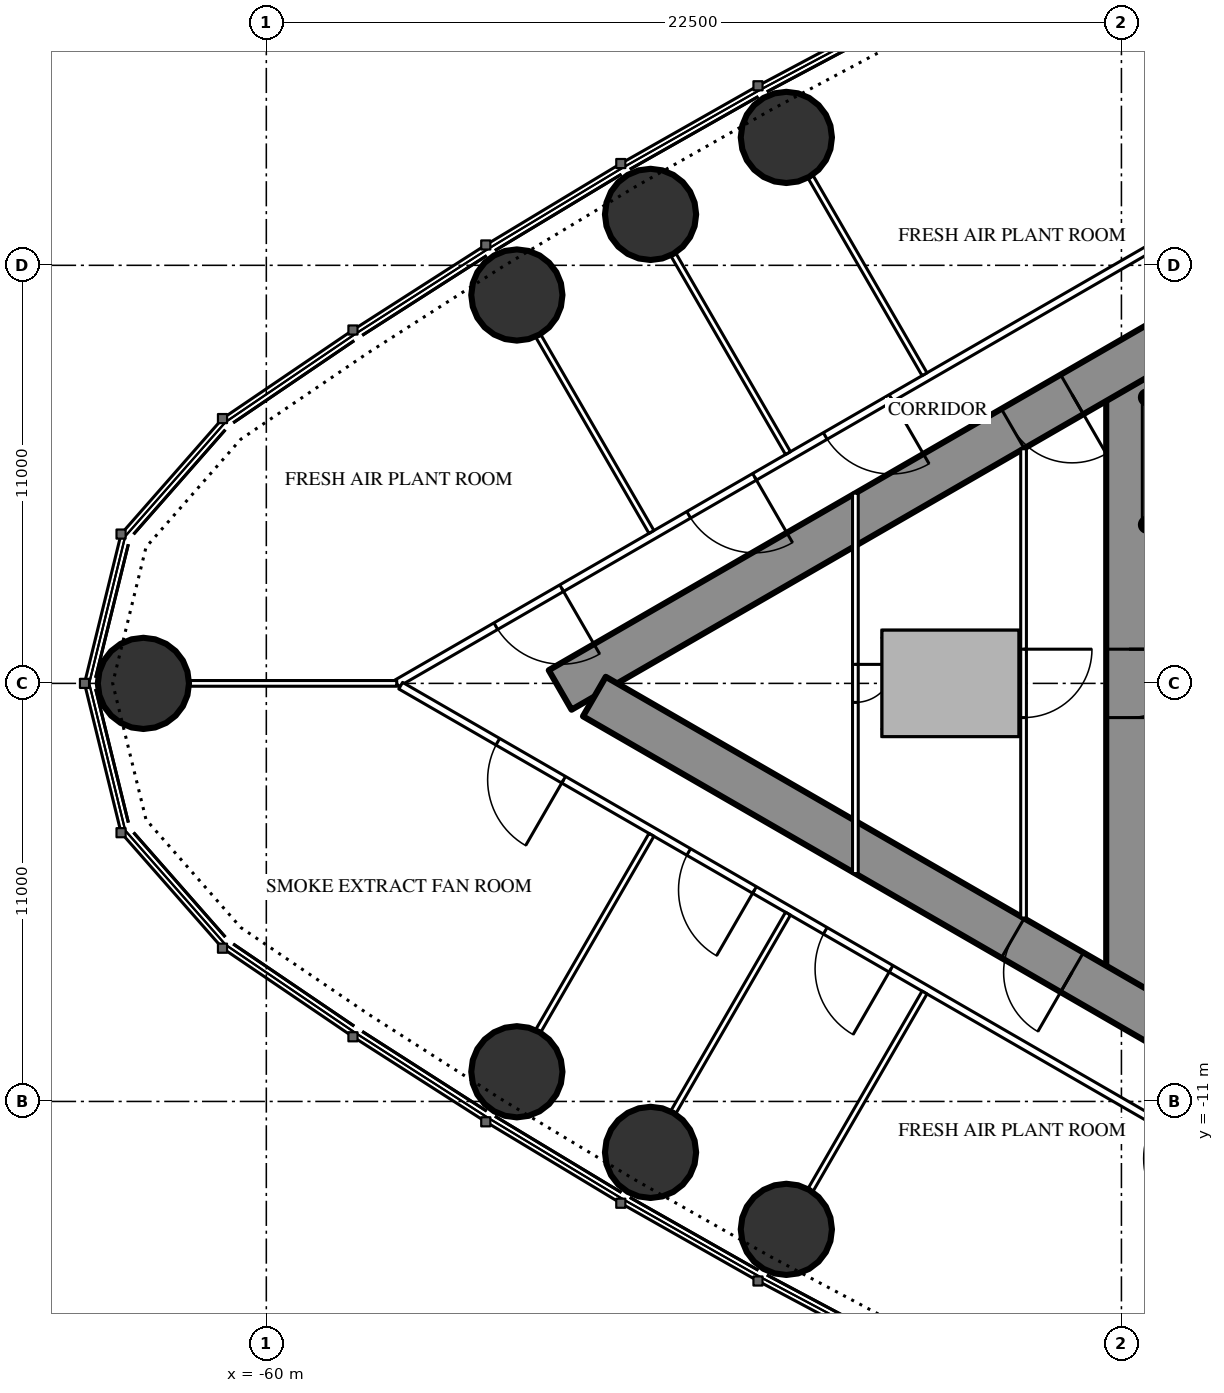
"""IFC4 building model, lengths in metres.
Left out: names, types, materials, properties, quantities, classifications, styles, units other than length and angle.
Written with IfcOpenShell. Run it as: python <this file> out.ifc"""

import sys

from ifc_helpers import new_model, si_unit, direction, frame, frame_2d, origin, origin_2d, place, context, subcontext, project, spatial, rectangle, circle, hollow_circle, extrude, element, fill, save


model = new_model("IFC4")
c1 = context("Model", 3, precision=1e-05, world=origin(), true_north=direction((0.0, 1.0)))
c2 = subcontext(c1, "Body", "Model", "MODEL_VIEW")
j1 = project(units=[si_unit("LENGTHUNIT", "METRE"), si_unit("PLANEANGLEUNIT", "RADIAN")], contexts=[c1])
p1 = place(None, origin())
s1 = spatial("IfcSite", under=j1, at=p1, CompositionType="ELEMENT")
p2 = place(p1, origin())
s2 = spatial("IfcBuilding", under=s1, at=p2, CompositionType="ELEMENT")
p3 = place(p2, frame((0.0, 0.0, 268.3)))
s3 = spatial("IfcBuildingStorey", under=s2, at=p3, CompositionType="ELEMENT", Elevation=268.3)
for number, where, z_axis, x_axis in (
    (1, (-63.234, 0.0, 0.0), (0.0, 0.0, 1.0), (1.0, 0.0, 0.0)),
    (2, (-53.408, -10.219, 0.0), (0.0, 0.0, 1.0), (1.0, 0.0, 0.0)),
    (3, (-49.89, -12.34, 0.0), (0.0, 0.0, 1.0), (1.0, 0.0, 0.0)),
    (4, (-46.317, -14.365, 0.0), (0.0, 0.0, 1.0), (1.0, 0.0, 0.0)),
    (5, (-46.317, 14.365, 0.0), (0.0, 0.0, 1.0), (1.0, 0.0, 0.0)),
    (6, (-49.89, 12.34, 0.0), (0.0, 0.0, 1.0), (1.0, 0.0, 0.0)),
    (7, (-53.408, 10.219, 0.0), (0.0, 0.0, 1.0), (1.0, 0.0, 0.0)),
):
    element("IfcColumn", number, at=place(p3, frame(where, z_axis=z_axis, x_axis=x_axis)), inside=s3, PredefinedType="COLUMN", context=c2, shape_type="SweptSolid", body=[
        extrude(circle(Radius=1.2, at=origin_2d()), origin(), (0.0, 0.0, 1.0), 5.0),
    ])
p4 = place(p3, frame((-37.3, 8.6, 0.0), z_axis=(0.0, 0.0, 1.0), x_axis=(0.0, -1.0, 0.0)))
e8 = element("IfcWall", 8, at=p4, inside=s3, PredefinedType="SHEAR", context=c2, shape_type="SweptSolid", body=[
    extrude(rectangle(XDim=17.2, YDim=1.2, at=frame_2d((8.6, 0.0))), origin(), (0.0, 0.0, 1.0), 5.0),
])
p5 = place(p4, frame((7.7, 0.0, 0.0)))
e9 = element("IfcOpeningElement", 9, at=p5, cuts=e8, PredefinedType="OPENING", context=c2, shape_type="SweptSolid", body=[
    extrude(rectangle(XDim=1.8, YDim=2.2, at=frame_2d((0.9, 1.1))), frame((0.0, 0.61, 0.0), z_axis=(0.0, -1.0, 0.0), x_axis=(1.0, 0.0, 0.0)), (0.0, 0.0, 1.0), 1.22),
])
p6 = place(p3, frame((-27.2, 14.3, 0.0), z_axis=(0.0, 0.0, 1.0), x_axis=(-0.866026593062, -0.499997940104, 0.0)))
e10 = element("IfcWall", 10, at=p6, inside=s3, PredefinedType="SHEAR", context=c2, shape_type="SweptSolid", body=[
    extrude(rectangle(XDim=28.946, YDim=1.2, at=frame_2d((14.473, 0.0))), origin(), (0.0, 0.0, 1.0), 5.0),
])
p7 = place(p6, frame((4.6, 0.0, 0.0)))
e11 = element("IfcOpeningElement", 11, at=p7, cuts=e10, PredefinedType="OPENING", context=c2, shape_type="SweptSolid", body=[
    extrude(rectangle(XDim=1.0, YDim=2.2, at=frame_2d((0.5, 1.1))), frame((0.0, 0.61, 0.0), z_axis=(0.0, -1.0, 0.0), x_axis=(1.0, 0.0, 0.0)), (0.0, 0.0, 1.0), 1.22),
])
p8 = place(p6, frame((13.395, 0.0, 0.0)))
e12 = element("IfcOpeningElement", 12, at=p8, cuts=e10, PredefinedType="OPENING", context=c2, shape_type="SweptSolid", body=[
    extrude(rectangle(XDim=1.8, YDim=2.2, at=frame_2d((0.9, 1.1))), frame((0.0, 0.61, 0.0), z_axis=(0.0, -1.0, 0.0), x_axis=(1.0, 0.0, 0.0)), (0.0, 0.0, 1.0), 1.22),
])
p9 = place(p3, frame((-27.2, -14.3, 0.0), z_axis=(0.0, 0.0, 1.0), x_axis=(-0.866024021859, 0.500002393557, 0.0)))
e13 = element("IfcWall", 13, at=p9, inside=s3, PredefinedType="SHEAR", context=c2, shape_type="SweptSolid", body=[
    extrude(rectangle(XDim=27.907, YDim=1.2, at=frame_2d((13.954, 0.0))), origin(), (0.0, 0.0, 1.0), 5.0),
])
p10 = place(p9, frame((4.6, 0.0, 0.0)))
e14 = element("IfcOpeningElement", 14, at=p10, cuts=e13, PredefinedType="OPENING", context=c2, shape_type="SweptSolid", body=[
    extrude(rectangle(XDim=1.0, YDim=2.2, at=frame_2d((0.5, 1.1))), frame((0.0, 0.61, 0.0), z_axis=(0.0, -1.0, 0.0), x_axis=(1.0, 0.0, 0.0)), (0.0, 0.0, 1.0), 1.22),
])
p11 = place(p9, frame((13.395, 0.0, 0.0)))
e15 = element("IfcOpeningElement", 15, at=p11, cuts=e13, PredefinedType="OPENING", context=c2, shape_type="SweptSolid", body=[
    extrude(rectangle(XDim=1.8, YDim=2.2, at=frame_2d((0.9, 1.1))), frame((0.0, 0.61, 0.0), z_axis=(0.0, -1.0, 0.0), x_axis=(1.0, 0.0, 0.0)), (0.0, 0.0, 1.0), 1.22),
])
for number, where, z_axis, x_axis in (
    (16, (-36.825, 7.525, 5.0), (0.0, 0.0, 1.0), (1.0, 0.0, 0.0)),
    (17, (-36.825, 4.175, 5.0), (0.0, 0.0, 1.0), (1.0, 0.0, 0.0)),
):
    element("IfcColumn", number, at=place(p3, frame(where, z_axis=z_axis, x_axis=x_axis)), inside=s3, PredefinedType="COLUMN", context=c2, shape_type="SweptSolid", body=[
        extrude(hollow_circle(Radius=0.162, WallThickness=0.012, at=origin_2d()), origin(), (0.0, 0.0, 1.0), 3.0),
    ])
p12 = place(p3, frame((-36.825, 7.422, 5.0), z_axis=(0.0, 0.0, 1.0), x_axis=(0.0, -1.0, 0.0)))
e18 = element("IfcWall", 18, at=p12, inside=s3, PredefinedType="SOLIDWALL", context=c2, shape_type="SweptSolid", body=[
    extrude(rectangle(XDim=3.144, YDim=0.25, at=frame_2d((1.572, 0.0))), origin(), (0.0, 0.0, 1.0), 2.54),
])
for number, where, z_axis, x_axis in (
    (19, (-43.8, -1.3, 5.0), (0.0, 0.0, 1.0), (1.0, 0.0, 0.0)),
    (20, (-40.2, 1.3, 5.0), (0.0, 0.0, 1.0), (-1.0, 0.0, 0.0)),
):
    element("IfcWall", number, at=place(p3, frame(where, z_axis=z_axis, x_axis=x_axis)), inside=s3, PredefinedType="SOLIDWALL", context=c2, shape_type="SweptSolid", body=[
        extrude(rectangle(XDim=3.6, YDim=0.2, at=frame_2d((1.8, 0.0))), origin(), (0.0, 0.0, 1.0), 2.6),
    ])
p13 = place(p3, frame((-43.7, 1.2, 5.0), z_axis=(0.0, 0.0, 1.0), x_axis=(0.0, -1.0, 0.0)))
e21 = element("IfcWall", 21, at=p13, inside=s3, PredefinedType="SOLIDWALL", context=c2, shape_type="SweptSolid", body=[
    extrude(rectangle(XDim=2.4, YDim=0.2, at=frame_2d((1.2, 0.0))), origin(), (0.0, 0.0, 1.0), 2.6),
])
p14 = place(p3, frame((-40.3, -1.2, 5.0), z_axis=(0.0, 0.0, 1.0), x_axis=(0.0, 1.0, 0.0)))
e22 = element("IfcWall", 22, at=p14, inside=s3, PredefinedType="SOLIDWALL", context=c2, shape_type="SweptSolid", body=[
    extrude(rectangle(XDim=2.4, YDim=0.2, at=frame_2d((1.2, 0.0))), origin(), (0.0, 0.0, 1.0), 2.6),
])
p15 = place(p14, frame((0.7, 0.0, 0.0)))
e23 = element("IfcOpeningElement", 23, at=p15, cuts=e22, PredefinedType="OPENING", context=c2, shape_type="SweptSolid", body=[
    extrude(rectangle(XDim=1.0, YDim=2.2, at=frame_2d((0.5, 1.1))), frame((0.0, 0.11, 0.0), z_axis=(0.0, -1.0, 0.0), x_axis=(1.0, 0.0, 0.0)), (0.0, 0.0, 1.0), 0.22),
])
p16 = place(p3, frame((-28.737, 16.068, 0.0), z_axis=(0.0, 0.0, 1.0), x_axis=(-0.866026057212, -0.499998868229, 0.0)))
e24 = element("IfcWall", 24, at=p16, inside=s3, PredefinedType="PARTITIONING", context=c2, shape_type="SweptSolid", body=[
    extrude(rectangle(XDim=32.137, YDim=0.2, at=frame_2d((16.068, 0.0))), origin(), (0.0, 0.0, 1.0), 4.7),
])
p17 = place(p16, frame((7.134, 0.0, 0.0)))
e25 = element("IfcOpeningElement", 25, at=p17, cuts=e24, PredefinedType="OPENING", context=c2, shape_type="SweptSolid", body=[
    extrude(rectangle(XDim=2.0, YDim=2.4, at=frame_2d((1.0, 1.2))), frame((0.0, 0.11, 0.0), z_axis=(0.0, -1.0, 0.0), x_axis=(1.0, 0.0, 0.0)), (0.0, 0.0, 1.0), 0.22),
])
p18 = place(p16, frame((17.117, 0.0, 0.0)))
e26 = element("IfcOpeningElement", 26, at=p18, cuts=e24, PredefinedType="OPENING", context=c2, shape_type="SweptSolid", body=[
    extrude(rectangle(XDim=2.0, YDim=2.4, at=frame_2d((1.0, 1.2))), frame((0.0, 0.11, 0.0), z_axis=(0.0, -1.0, 0.0), x_axis=(1.0, 0.0, 0.0)), (0.0, 0.0, 1.0), 0.22),
])
p19 = place(p16, frame((21.266, 0.0, 0.0)))
e27 = element("IfcOpeningElement", 27, at=p19, cuts=e24, PredefinedType="OPENING", context=c2, shape_type="SweptSolid", body=[
    extrude(rectangle(XDim=2.0, YDim=2.4, at=frame_2d((1.0, 1.2))), frame((0.0, 0.11, 0.0), z_axis=(0.0, -1.0, 0.0), x_axis=(1.0, 0.0, 0.0)), (0.0, 0.0, 1.0), 0.22),
])
p20 = place(p16, frame((27.126, 0.0, 0.0)))
e28 = element("IfcOpeningElement", 28, at=p20, cuts=e24, PredefinedType="OPENING", context=c2, shape_type="SweptSolid", body=[
    extrude(rectangle(XDim=2.0, YDim=2.4, at=frame_2d((1.0, 1.2))), frame((0.0, 0.11, 0.0), z_axis=(0.0, -1.0, 0.0), x_axis=(1.0, 0.0, 0.0)), (0.0, 0.0, 1.0), 0.22),
])
p21 = place(p3, frame((-28.737, -16.068, 0.0), z_axis=(0.0, 0.0, 1.0), x_axis=(-0.866026220747, 0.499998584977, 0.0)))
e29 = element("IfcWall", 29, at=p21, inside=s3, PredefinedType="PARTITIONING", context=c2, shape_type="SweptSolid", body=[
    extrude(rectangle(XDim=32.017, YDim=0.2, at=frame_2d((16.008, 0.0))), origin(), (0.0, 0.0, 1.0), 4.7),
])
p22 = place(p21, frame((27.066, 0.0, 0.0)))
e30 = element("IfcOpeningElement", 30, at=p22, cuts=e29, PredefinedType="OPENING", context=c2, shape_type="SweptSolid", body=[
    extrude(rectangle(XDim=2.0, YDim=2.4, at=frame_2d((1.0, 1.2))), frame((0.0, 0.11, 0.0), z_axis=(0.0, -1.0, 0.0), x_axis=(1.0, 0.0, 0.0)), (0.0, 0.0, 1.0), 0.22),
])
p23 = place(p21, frame((21.266, 0.0, 0.0)))
e31 = element("IfcOpeningElement", 31, at=p23, cuts=e29, PredefinedType="OPENING", context=c2, shape_type="SweptSolid", body=[
    extrude(rectangle(XDim=2.0, YDim=2.4, at=frame_2d((1.0, 1.2))), frame((0.0, 0.11, 0.0), z_axis=(0.0, -1.0, 0.0), x_axis=(1.0, 0.0, 0.0)), (0.0, 0.0, 1.0), 0.22),
])
p24 = place(p21, frame((17.117, 0.0, 0.0)))
e32 = element("IfcOpeningElement", 32, at=p24, cuts=e29, PredefinedType="OPENING", context=c2, shape_type="SweptSolid", body=[
    extrude(rectangle(XDim=2.0, YDim=2.4, at=frame_2d((1.0, 1.2))), frame((0.0, 0.11, 0.0), z_axis=(0.0, -1.0, 0.0), x_axis=(1.0, 0.0, 0.0)), (0.0, 0.0, 1.0), 0.22),
])
p25 = place(p21, frame((7.134, 0.0, 0.0)))
e33 = element("IfcOpeningElement", 33, at=p25, cuts=e29, PredefinedType="OPENING", context=c2, shape_type="SweptSolid", body=[
    extrude(rectangle(XDim=2.0, YDim=2.4, at=frame_2d((1.0, 1.2))), frame((0.0, 0.11, 0.0), z_axis=(0.0, -1.0, 0.0), x_axis=(1.0, 0.0, 0.0)), (0.0, 0.0, 1.0), 0.22),
])
p26 = place(p3, frame((-42.68, 8.134, 0.0), z_axis=(0.0, 0.0, 1.0), x_axis=(-0.499984479505, 0.866034364361, 0.0)))
e34 = element("IfcWall", 34, at=p26, inside=s3, PredefinedType="PARTITIONING", context=c2, shape_type="SweptSolid", body=[
    extrude(rectangle(XDim=5.995, YDim=0.15, at=frame_2d((2.998, 0.0))), origin(), (0.0, 0.0, 1.0), 3.8),
])
p27 = place(p3, frame((-46.274, 6.059, 0.0), z_axis=(0.0, 0.0, 1.0), x_axis=(-0.500020471368, 0.866013584312, 0.0)))
e35 = element("IfcWall", 35, at=p27, inside=s3, PredefinedType="PARTITIONING", context=c2, shape_type="SweptSolid", body=[
    extrude(rectangle(XDim=6.028, YDim=0.15, at=frame_2d((3.014, 0.0))), origin(), (0.0, 0.0, 1.0), 3.8),
])
p28 = place(p3, frame((-49.866, 3.985, 0.0), z_axis=(0.0, 0.0, 1.0), x_axis=(-0.500000694566, 0.866025002776, 0.0)))
e36 = element("IfcWall", 36, at=p28, inside=s3, PredefinedType="PARTITIONING", context=c2, shape_type="SweptSolid", body=[
    extrude(rectangle(XDim=5.95, YDim=0.15, at=frame_2d((2.975, 0.0))), origin(), (0.0, 0.0, 1.0), 3.8),
])
p29 = place(p3, frame((-42.68, -8.134, 0.0), z_axis=(0.0, 0.0, 1.0), x_axis=(-0.499984479505, -0.866034364361, 0.0)))
e37 = element("IfcWall", 37, at=p29, inside=s3, PredefinedType="PARTITIONING", context=c2, shape_type="SweptSolid", body=[
    extrude(rectangle(XDim=5.995, YDim=0.15, at=frame_2d((2.998, 0.0))), origin(), (0.0, 0.0, 1.0), 3.8),
])
p30 = place(p3, frame((-46.274, -6.059, 0.0), z_axis=(0.0, 0.0, 1.0), x_axis=(-0.500020471368, -0.866013584312, 0.0)))
e38 = element("IfcWall", 38, at=p30, inside=s3, PredefinedType="PARTITIONING", context=c2, shape_type="SweptSolid", body=[
    extrude(rectangle(XDim=6.028, YDim=0.15, at=frame_2d((3.014, 0.0))), origin(), (0.0, 0.0, 1.0), 3.8),
])
p31 = place(p3, frame((-49.866, -3.985, 0.0), z_axis=(0.0, 0.0, 1.0), x_axis=(-0.500000694566, -0.866025002776, 0.0)))
e39 = element("IfcWall", 39, at=p31, inside=s3, PredefinedType="PARTITIONING", context=c2, shape_type="SweptSolid", body=[
    extrude(rectangle(XDim=5.95, YDim=0.15, at=frame_2d((2.975, 0.0))), origin(), (0.0, 0.0, 1.0), 3.8),
])
p32 = place(p3, frame((-56.568, 0.0, 0.0), z_axis=(0.0, 0.0, 1.0), x_axis=(-1.0, 0.0, 0.0)))
e40 = element("IfcWall", 40, at=p32, inside=s3, PredefinedType="PARTITIONING", context=c2, shape_type="SweptSolid", body=[
    extrude(rectangle(XDim=5.446, YDim=0.15, at=frame_2d((2.723, 0.0))), origin(), (0.0, 0.0, 1.0), 3.8),
])
p33 = place(p3, frame((-40.075, 6.174, 0.0), z_axis=(0.0, 0.0, 1.0), x_axis=(0.0, -1.0, 0.0)))
e41 = element("IfcWall", 41, at=p33, inside=s3, PredefinedType="PARTITIONING", context=c2, shape_type="SweptSolid", body=[
    extrude(rectangle(XDim=12.348, YDim=0.15, at=frame_2d((6.174, 0.0))), origin(), (0.0, 0.0, 1.0), 4.7),
])
p34 = place(p33, frame((5.274, 0.0, 0.0)))
e42 = element("IfcOpeningElement", 42, at=p34, cuts=e41, PredefinedType="OPENING", context=c2, shape_type="SweptSolid", body=[
    extrude(rectangle(XDim=1.8, YDim=2.2, at=frame_2d((0.9, 1.1))), frame((0.0, 0.085, 0.0), z_axis=(0.0, -1.0, 0.0), x_axis=(1.0, 0.0, 0.0)), (0.0, 0.0, 1.0), 0.17),
])
p35 = place(p3, frame((-44.5, 5.005, 0.0), z_axis=(0.0, 0.0, 1.0), x_axis=(0.0, -1.0, 0.0)))
e43 = element("IfcWall", 43, at=p35, inside=s3, PredefinedType="PARTITIONING", context=c2, shape_type="SweptSolid", body=[
    extrude(rectangle(XDim=10.009, YDim=0.15, at=frame_2d((5.005, 0.0))), origin(), (0.0, 0.0, 1.0), 3.85),
])
p36 = place(p35, frame((4.505, 0.0, 0.0)))
e44 = element("IfcOpeningElement", 44, at=p36, cuts=e43, PredefinedType="OPENING", context=c2, shape_type="SweptSolid", body=[
    extrude(rectangle(XDim=1.0, YDim=2.2, at=frame_2d((0.5, 1.1))), frame((0.0, 0.085, 0.0), z_axis=(0.0, -1.0, 0.0), x_axis=(1.0, 0.0, 0.0)), (0.0, 0.0, 1.0), 0.17),
])
p37 = place(p15, origin())
e45 = element("IfcDoor", 45, at=p37, inside=s3, OperationType="SINGLE_SWING_LEFT", PredefinedType="DOOR", context=c2, shape_type="SweptSolid", body=[
    extrude(rectangle(XDim=1.0, YDim=2.2, at=frame_2d((0.5, 1.1))), frame((0.0, 0.025, 0.0), z_axis=(0.0, -1.0, 0.0), x_axis=(1.0, 0.0, 0.0)), (0.0, 0.0, 1.0), 0.05),
])
fill(e23, e45)
p38 = place(p18, origin())
e46 = element("IfcDoor", 46, at=p38, inside=s3, OperationType="DOUBLE_DOOR_SINGLE_SWING", PredefinedType="DOOR", context=c2, shape_type="SweptSolid", body=[
    extrude(rectangle(XDim=2.0, YDim=2.4, at=frame_2d((1.0, 1.2))), frame((0.0, 0.025, 0.0), z_axis=(0.0, -1.0, 0.0), x_axis=(1.0, 0.0, 0.0)), (0.0, 0.0, 1.0), 0.05),
])
fill(e26, e46)
p39 = place(p19, origin())
e47 = element("IfcDoor", 47, at=p39, inside=s3, OperationType="DOUBLE_DOOR_SINGLE_SWING", PredefinedType="DOOR", context=c2, shape_type="SweptSolid", body=[
    extrude(rectangle(XDim=2.0, YDim=2.4, at=frame_2d((1.0, 1.2))), frame((0.0, 0.025, 0.0), z_axis=(0.0, -1.0, 0.0), x_axis=(1.0, 0.0, 0.0)), (0.0, 0.0, 1.0), 0.05),
])
fill(e27, e47)
p40 = place(p20, origin())
e48 = element("IfcDoor", 48, at=p40, inside=s3, OperationType="DOUBLE_DOOR_SINGLE_SWING", PredefinedType="DOOR", context=c2, shape_type="SweptSolid", body=[
    extrude(rectangle(XDim=2.0, YDim=2.4, at=frame_2d((1.0, 1.2))), frame((0.0, 0.025, 0.0), z_axis=(0.0, -1.0, 0.0), x_axis=(1.0, 0.0, 0.0)), (0.0, 0.0, 1.0), 0.05),
])
fill(e28, e48)
p41 = place(p22, origin())
e49 = element("IfcDoor", 49, at=p41, inside=s3, OperationType="DOUBLE_DOOR_SINGLE_SWING", PredefinedType="DOOR", context=c2, shape_type="SweptSolid", body=[
    extrude(rectangle(XDim=2.0, YDim=2.4, at=frame_2d((1.0, 1.2))), frame((0.0, 0.025, 0.0), z_axis=(0.0, -1.0, 0.0), x_axis=(1.0, 0.0, 0.0)), (0.0, 0.0, 1.0), 0.05),
])
fill(e30, e49)
p42 = place(p23, origin())
e50 = element("IfcDoor", 50, at=p42, inside=s3, OperationType="DOUBLE_DOOR_SINGLE_SWING", PredefinedType="DOOR", context=c2, shape_type="SweptSolid", body=[
    extrude(rectangle(XDim=2.0, YDim=2.4, at=frame_2d((1.0, 1.2))), frame((0.0, 0.025, 0.0), z_axis=(0.0, -1.0, 0.0), x_axis=(1.0, 0.0, 0.0)), (0.0, 0.0, 1.0), 0.05),
])
fill(e31, e50)
p43 = place(p24, origin())
e51 = element("IfcDoor", 51, at=p43, inside=s3, OperationType="DOUBLE_DOOR_SINGLE_SWING", PredefinedType="DOOR", context=c2, shape_type="SweptSolid", body=[
    extrude(rectangle(XDim=2.0, YDim=2.4, at=frame_2d((1.0, 1.2))), frame((0.0, 0.025, 0.0), z_axis=(0.0, -1.0, 0.0), x_axis=(1.0, 0.0, 0.0)), (0.0, 0.0, 1.0), 0.05),
])
fill(e32, e51)
p44 = place(p34, origin())
e52 = element("IfcDoor", 52, at=p44, inside=s3, OperationType="DOUBLE_DOOR_SINGLE_SWING", PredefinedType="DOOR", context=c2, shape_type="SweptSolid", body=[
    extrude(rectangle(XDim=1.8, YDim=2.2, at=frame_2d((0.9, 1.1))), frame((0.0, 0.025, 0.0), z_axis=(0.0, -1.0, 0.0), x_axis=(1.0, 0.0, 0.0)), (0.0, 0.0, 1.0), 0.05),
])
fill(e42, e52)
p45 = place(p36, origin())
e53 = element("IfcDoor", 53, at=p45, inside=s3, OperationType="SINGLE_SWING_LEFT", PredefinedType="DOOR", context=c2, shape_type="SweptSolid", body=[
    extrude(rectangle(XDim=1.0, YDim=2.2, at=frame_2d((0.5, 1.1))), frame((0.0, 0.025, 0.0), z_axis=(0.0, -1.0, 0.0), x_axis=(1.0, 0.0, 0.0)), (0.0, 0.0, 1.0), 0.05),
])
fill(e44, e53)
p46 = place(p8, origin())
e54 = element("IfcDoor", 54, at=p46, inside=s3, OperationType="DOUBLE_DOOR_SINGLE_SWING", PredefinedType="DOOR", context=c2, shape_type="SweptSolid", body=[
    extrude(rectangle(XDim=1.8, YDim=2.2, at=frame_2d((0.9, 1.1))), frame((0.0, 0.025, 0.0), z_axis=(0.0, -1.0, 0.0), x_axis=(1.0, 0.0, 0.0)), (0.0, 0.0, 1.0), 0.05),
])
fill(e12, e54)
p47 = place(p11, origin())
e55 = element("IfcDoor", 55, at=p47, inside=s3, OperationType="DOUBLE_DOOR_SINGLE_SWING", PredefinedType="DOOR", context=c2, shape_type="SweptSolid", body=[
    extrude(rectangle(XDim=1.8, YDim=2.2, at=frame_2d((0.9, 1.1))), frame((0.0, 0.025, 0.0), z_axis=(0.0, -1.0, 0.0), x_axis=(1.0, 0.0, 0.0)), (0.0, 0.0, 1.0), 0.05),
])
fill(e15, e55)
p48 = place(p5, origin())
e56 = element("IfcDoor", 56, at=p48, inside=s3, OperationType="DOUBLE_DOOR_SINGLE_SWING", PredefinedType="DOOR", context=c2, shape_type="SweptSolid", body=[
    extrude(rectangle(XDim=1.8, YDim=2.2, at=frame_2d((0.9, 1.1))), frame((0.0, 0.025, 0.0), z_axis=(0.0, -1.0, 0.0), x_axis=(1.0, 0.0, 0.0)), (0.0, 0.0, 1.0), 0.05),
])
fill(e9, e56)
save(model, sys.argv[1])
